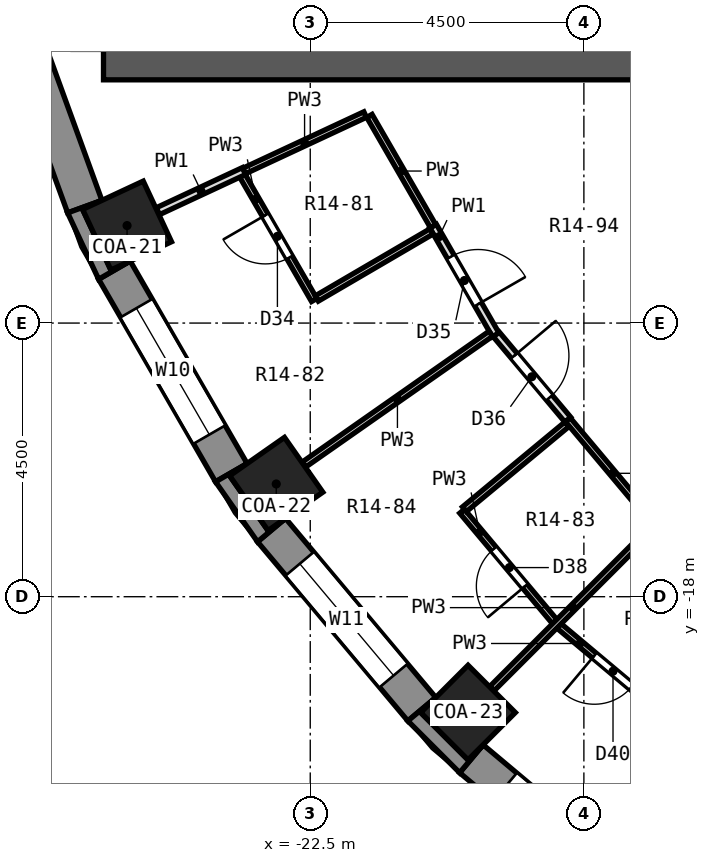
"""IFC4 building model, lengths in metres.
Left out: names, types, materials, properties, quantities, classifications, styles, units other than length and angle.
Written with IfcOpenShell. Run it as: python <this file> out.ifc"""

import sys

from ifc_helpers import new_model, si_unit, direction, frame, frame_2d, origin, origin_2d, place, context, subcontext, project, spatial, polyline, rectangle, outline, extrude, element, fill, save


model = new_model("IFC4")
c1 = context("Model", 3, precision=1e-05, world=origin(), true_north=direction((0.0, 1.0)))
c2 = subcontext(c1, "Body", "Model", "MODEL_VIEW")
j1 = project(units=[si_unit("LENGTHUNIT", "METRE"), si_unit("PLANEANGLEUNIT", "RADIAN")], contexts=[c1])
p1 = place(None, origin())
s1 = spatial("IfcSite", under=j1, at=p1, CompositionType="ELEMENT")
p2 = place(p1, origin())
s2 = spatial("IfcBuilding", under=s1, at=p2, CompositionType="ELEMENT")
p3 = place(p2, frame((0.0, 0.0, 75.8)))
s3 = spatial("IfcBuildingStorey", under=s2, at=p3, CompositionType="ELEMENT", Elevation=75.8)
for number, where, z_axis, x_axis in (
    (1, (-25.512, -11.897, 0.0), (0.0, 0.0, 1.0), (-0.906, -0.423, 0.0)),
    (2, (-23.059, -16.146, 0.0), (0.0, 0.0, 1.0), (-0.819, -0.574, 0.0)),
    (3, (-19.905, -19.905, 0.0), (0.0, 0.0, 1.0), (-0.707, -0.707, 0.0)),
):
    element("IfcColumn", number, at=place(p3, frame(where, z_axis=z_axis, x_axis=x_axis)), inside=s3, PredefinedType="COLUMN", context=c2, shape_type="SweptSolid", body=[
        extrude(rectangle(XDim=1.1, YDim=1.1, at=origin_2d()), origin(), (0.0, 0.0, 1.0), 3.3),
    ])
p4 = place(p3, frame((-13.5, -9.0, 0.0), z_axis=(0.0, 0.0, 1.0), x_axis=(-1.0, 0.0, 0.0)))
e4 = element("IfcWall", 4, at=p4, inside=s3, PredefinedType="SHEAR", context=c2, shape_type="SweptSolid", body=[
    extrude(rectangle(XDim=12.4, YDim=1.0, at=frame_2d((6.2, 0.0))), origin(), (0.0, 0.0, 1.0), 3.3),
])
p5 = place(p3, frame((-27.523, -7.971, 0.0), z_axis=(0.0, 0.0, 1.0), x_axis=(0.342028474173, -0.939689588564, 0.0)))
e5 = element("IfcWall", 5, at=p5, inside=s3, PredefinedType="SOLIDWALL", context=c2, shape_type="SweptSolid", body=[
    extrude(rectangle(XDim=3.846, YDim=0.6, at=frame_2d((1.923, 0.0))), origin(), (0.0, 0.0, 1.0), 2.75),
])
p6 = place(p3, frame((-25.721, -12.63, 0.0), z_axis=(0.0, 0.0, 1.0), x_axis=(0.499989888488, -0.86603124159, 0.0)))
e6 = element("IfcWall", 6, at=p6, inside=s3, PredefinedType="SOLIDWALL", context=c2, shape_type="SweptSolid", body=[
    extrude(rectangle(XDim=3.846, YDim=0.6, at=frame_2d((1.923, 0.0))), origin(), (0.0, 0.0, 1.0), 2.75),
])
p7 = place(p6, frame((0.723, 0.0, 0.9)))
e7 = element("IfcOpeningElement", 7, at=p7, cuts=e6, PredefinedType="OPENING", context=c2, shape_type="SweptSolid", body=[
    extrude(rectangle(XDim=2.4, YDim=1.8, at=frame_2d((1.2, 0.9))), frame((0.0, 0.312, 0.0), z_axis=(0.0, -1.0, 0.0), x_axis=(1.0, 0.0, 0.0)), (0.0, 0.0, 1.0), 0.624),
])
p8 = place(p3, frame((-23.137, -16.904, 0.0), z_axis=(0.0, 0.0, 1.0), x_axis=(0.642809392687, -0.766026164483, 0.0)))
e8 = element("IfcWall", 8, at=p8, inside=s3, PredefinedType="SOLIDWALL", context=c2, shape_type="SweptSolid", body=[
    extrude(rectangle(XDim=3.846, YDim=0.6, at=frame_2d((1.923, 0.0))), origin(), (0.0, 0.0, 1.0), 2.75),
])
p9 = place(p8, frame((0.723, 0.0, 0.9)))
e9 = element("IfcOpeningElement", 9, at=p9, cuts=e8, PredefinedType="OPENING", context=c2, shape_type="SweptSolid", body=[
    extrude(rectangle(XDim=2.4, YDim=1.8, at=frame_2d((1.2, 0.9))), frame((0.0, 0.312, 0.0), z_axis=(0.0, -1.0, 0.0), x_axis=(1.0, 0.0, 0.0)), (0.0, 0.0, 1.0), 0.624),
])
p10 = place(p3, frame((-19.85, -20.665, 0.0), z_axis=(0.0, 0.0, 1.0), x_axis=(0.766026164483, -0.642809392687, 0.0)))
e10 = element("IfcWall", 10, at=p10, inside=s3, PredefinedType="SOLIDWALL", context=c2, shape_type="SweptSolid", body=[
    extrude(rectangle(XDim=3.846, YDim=0.6, at=frame_2d((1.923, 0.0))), origin(), (0.0, 0.0, 1.0), 2.75),
])
p11 = place(p10, frame((0.723, 0.0, 0.9)))
e11 = element("IfcOpeningElement", 11, at=p11, cuts=e10, PredefinedType="OPENING", context=c2, shape_type="SweptSolid", body=[
    extrude(rectangle(XDim=2.4, YDim=1.8, at=frame_2d((1.2, 0.9))), frame((0.0, 0.312, 0.0), z_axis=(0.0, -1.0, 0.0), x_axis=(1.0, 0.0, 0.0)), (0.0, 0.0, 1.0), 0.624),
])
p12 = place(p3, origin())
e12 = element("IfcWall", 12, at=p12, inside=s3, PredefinedType="SOLIDWALL", context=c2, shape_type="SweptSolid", body=[
    extrude(outline(polyline([(-25.981, -12.78), (-25.461, -12.479), (-25.779, -12.628), (-26.243, -11.631), (-25.926, -11.483), (-26.49, -11.688), (-25.981, -12.78)])), origin(), (0.0, 0.0, 1.0), 2.75),
])
p13 = place(p3, origin())
e13 = element("IfcWall", 13, at=p13, inside=s3, PredefinedType="SOLIDWALL", context=c2, shape_type="SweptSolid", body=[
    extrude(outline(polyline([(-24.058, -16.11), (-23.367, -17.097), (-22.907, -16.711), (-23.194, -16.912), (-23.825, -16.011), (-23.538, -15.81), (-24.058, -16.11)])), origin(), (0.0, 0.0, 1.0), 2.75),
])
p14 = place(p3, origin())
e14 = element("IfcWall", 14, at=p14, inside=s3, PredefinedType="SOLIDWALL", context=c2, shape_type="SweptSolid", body=[
    extrude(outline(polyline([(-20.043, -20.895), (-19.657, -20.435), (-19.905, -20.683), (-20.683, -19.905), (-20.435, -19.657), (-20.895, -20.043), (-20.043, -20.895)])), origin(), (0.0, 0.0, 1.0), 2.75),
])
p15 = place(p3, frame((-20.48, -11.906, 0.0), z_axis=(0.0, 0.0, 1.0), x_axis=(0.499101616471, -0.866543464828, 0.0)))
e15 = element("IfcWall", 15, at=p15, inside=s3, PredefinedType="PARTITIONING", context=c2, shape_type="SweptSolid", body=[
    extrude(rectangle(XDim=2.066, YDim=0.125, at=frame_2d((1.033, 0.0))), origin(), (0.0, 0.0, 1.0), 2.75),
])
p16 = place(p15, frame((0.582, 0.0, 0.0)))
e16 = element("IfcOpeningElement", 16, at=p16, cuts=e15, PredefinedType="OPENING", context=c2, shape_type="SweptSolid", body=[
    extrude(rectangle(XDim=0.9, YDim=2.1, at=frame_2d((0.45, 1.05))), frame((0.0, 0.074, 0.0), z_axis=(0.0, -1.0, 0.0), x_axis=(1.0, 0.0, 0.0)), (0.0, 0.0, 1.0), 0.149),
])
p17 = place(p3, frame((-23.619, -11.071, 0.0), z_axis=(0.0, 0.0, 1.0), x_axis=(0.500121220083, -0.865955406025, 0.0)))
e17 = element("IfcWall", 17, at=p17, inside=s3, PredefinedType="PARTITIONING", context=c2, shape_type="SweptSolid", body=[
    extrude(rectangle(XDim=2.367, YDim=0.1, at=frame_2d((1.184, 0.0))), origin(), (0.0, 0.0, 1.0), 2.75),
])
p18 = place(p17, frame((0.757, 0.0, 0.0)))
e18 = element("IfcOpeningElement", 18, at=p18, cuts=e17, PredefinedType="OPENING", context=c2, shape_type="SweptSolid", body=[
    extrude(rectangle(XDim=0.8, YDim=2.1, at=frame_2d((0.4, 1.05))), frame((0.0, 0.062, 0.0), z_axis=(0.0, -1.0, 0.0), x_axis=(1.0, 0.0, 0.0)), (0.0, 0.0, 1.0), 0.124),
])
p19 = place(p3, frame((-21.527, -10.093, 0.0), z_axis=(0.0, 0.0, 1.0), x_axis=(0.500153222552, -0.865936922628, 0.0)))
e19 = element("IfcWall", 19, at=p19, inside=s3, PredefinedType="PARTITIONING", context=c2, shape_type="SweptSolid", body=[
    extrude(rectangle(XDim=2.093, YDim=0.1, at=frame_2d((1.046, 0.0))), origin(), (0.0, 0.0, 1.0), 2.75),
])
p20 = place(p3, frame((-20.003, -16.594, 0.0), z_axis=(0.0, 0.0, 1.0), x_axis=(0.642582995886, -0.766216087927, 0.0)))
e20 = element("IfcWall", 20, at=p20, inside=s3, PredefinedType="PARTITIONING", context=c2, shape_type="SweptSolid", body=[
    extrude(rectangle(XDim=2.37, YDim=0.1, at=frame_2d((1.185, 0.0))), origin(), (0.0, 0.0, 1.0), 2.75),
])
p21 = place(p20, frame((0.81, 0.0, 0.0)))
e21 = element("IfcOpeningElement", 21, at=p21, cuts=e20, PredefinedType="OPENING", context=c2, shape_type="SweptSolid", body=[
    extrude(rectangle(XDim=0.8, YDim=2.1, at=frame_2d((0.4, 1.05))), frame((0.0, 0.062, 0.0), z_axis=(0.0, -1.0, 0.0), x_axis=(1.0, 0.0, 0.0)), (0.0, 0.0, 1.0), 0.124),
])
p22 = place(p3, frame((-18.265, -15.088, 0.0), z_axis=(0.0, 0.0, 1.0), x_axis=(0.642971075568, -0.765890459519, 0.0)))
e22 = element("IfcWall", 22, at=p22, inside=s3, PredefinedType="PARTITIONING", context=c2, shape_type="SweptSolid", body=[
    extrude(rectangle(XDim=2.306, YDim=0.1, at=frame_2d((1.153, 0.0))), origin(), (0.0, 0.0, 1.0), 2.75),
])
p23 = place(p3, frame((-19.44, -13.688, 0.0), z_axis=(0.0, 0.0, 1.0), x_axis=(0.642900643574, -0.765949582213, 0.0)))
e23 = element("IfcWall", 23, at=p23, inside=s3, PredefinedType="PARTITIONING", context=c2, shape_type="SweptSolid", body=[
    extrude(rectangle(XDim=1.827, YDim=0.125, at=frame_2d((0.914, 0.0))), origin(), (0.0, 0.0, 1.0), 2.75),
])
p24 = place(p23, frame((0.458, 0.0, 0.0)))
e24 = element("IfcOpeningElement", 24, at=p24, cuts=e23, PredefinedType="OPENING", context=c2, shape_type="SweptSolid", body=[
    extrude(rectangle(XDim=0.9, YDim=2.1, at=frame_2d((0.45, 1.05))), frame((0.0, 0.074, 0.0), z_axis=(0.0, -1.0, 0.0), x_axis=(1.0, 0.0, 0.0)), (0.0, 0.0, 1.0), 0.149),
])
p25 = place(p3, frame((-18.41, -18.48, 0.0), z_axis=(0.0, 0.0, 1.0), x_axis=(0.766216087927, -0.642582995886, 0.0)))
e25 = element("IfcWall", 25, at=p25, inside=s3, PredefinedType="PARTITIONING", context=c2, shape_type="SweptSolid", body=[
    extrude(rectangle(XDim=2.37, YDim=0.1, at=frame_2d((1.185, 0.0))), origin(), (0.0, 0.0, 1.0), 2.75),
])
p26 = place(p25, frame((0.76, 0.0, 0.0)))
e26 = element("IfcOpeningElement", 26, at=p26, cuts=e25, PredefinedType="OPENING", context=c2, shape_type="SweptSolid", body=[
    extrude(rectangle(XDim=0.8, YDim=2.1, at=frame_2d((0.4, 1.05))), frame((0.0, 0.062, 0.0), z_axis=(0.0, -1.0, 0.0), x_axis=(1.0, 0.0, 0.0)), (0.0, 0.0, 1.0), 0.124),
])
p27 = place(p3, frame((-25.005, -11.66, 0.0), z_axis=(0.0, 0.0, 1.0), x_axis=(0.906366605584, 0.422492102034, 0.0)))
e27 = element("IfcWall", 27, at=p27, inside=s3, PredefinedType="PARTITIONING", context=c2, shape_type="SweptSolid", body=[
    extrude(rectangle(XDim=1.563, YDim=0.125, at=frame_2d((0.781, 0.0))), origin(), (0.0, 0.0, 1.0), 2.75),
])
p28 = place(p3, frame((-23.588, -11.0, 0.0), z_axis=(0.0, 0.0, 1.0), x_axis=(0.906316523208, 0.422599526454, 0.0)))
e28 = element("IfcWall", 28, at=p28, inside=s3, PredefinedType="PARTITIONING", context=c2, shape_type="SweptSolid", body=[
    extrude(rectangle(XDim=2.197, YDim=0.1, at=frame_2d((1.099, 0.0))), origin(), (0.0, 0.0, 1.0), 2.75),
])
p29 = place(p3, frame((-22.392, -13.096, 0.0), z_axis=(0.0, 0.0, 1.0), x_axis=(0.863305021383, 0.504682514116, 0.0)))
e29 = element("IfcWall", 29, at=p29, inside=s3, PredefinedType="PARTITIONING", context=c2, shape_type="SweptSolid", body=[
    extrude(rectangle(XDim=2.188, YDim=0.1, at=frame_2d((1.094, 0.0))), origin(), (0.0, 0.0, 1.0), 2.75),
])
p30 = place(p3, frame((-22.601, -15.825, 0.0), z_axis=(0.0, 0.0, 1.0), x_axis=(0.819152325028, 0.573576035414, 0.0)))
e30 = element("IfcWall", 30, at=p30, inside=s3, PredefinedType="PARTITIONING", context=c2, shape_type="SweptSolid", body=[
    extrude(rectangle(XDim=3.747, YDim=0.1, at=frame_2d((1.874, 0.0))), origin(), (0.0, 0.0, 1.0), 2.75),
])
p31 = place(p3, frame((-19.965, -16.562, 0.0), z_axis=(0.0, 0.0, 1.0), x_axis=(0.769792742447, 0.638293924204, 0.0)))
e31 = element("IfcWall", 31, at=p31, inside=s3, PredefinedType="PARTITIONING", context=c2, shape_type="SweptSolid", body=[
    extrude(rectangle(XDim=2.187, YDim=0.1, at=frame_2d((1.094, 0.0))), origin(), (0.0, 0.0, 1.0), 2.75),
])
p32 = place(p3, frame((-19.509, -19.509, 0.0), z_axis=(0.0, 0.0, 1.0), x_axis=(0.707106781187, 0.707106781187, 0.0)))
e32 = element("IfcWall", 32, at=p32, inside=s3, PredefinedType="PARTITIONING", context=c2, shape_type="SweptSolid", body=[
    extrude(rectangle(XDim=3.76, YDim=0.1, at=frame_2d((1.88, 0.0))), origin(), (0.0, 0.0, 1.0), 2.75),
])
p33 = place(p7, origin())
e33 = element("IfcWindow", 33, at=p33, inside=s3, PartitioningType="SINGLE_PANEL", PredefinedType="WINDOW", context=c2, shape_type="SweptSolid", body=[
    extrude(rectangle(XDim=2.4, YDim=1.8, at=frame_2d((1.2, 0.9))), frame((0.0, 0.18, 0.0), z_axis=(0.0, -1.0, 0.0), x_axis=(1.0, 0.0, 0.0)), (0.0, 0.0, 1.0), 0.06),
])
fill(e7, e33)
p34 = place(p9, origin())
e34 = element("IfcWindow", 34, at=p34, inside=s3, PartitioningType="SINGLE_PANEL", PredefinedType="WINDOW", context=c2, shape_type="SweptSolid", body=[
    extrude(rectangle(XDim=2.4, YDim=1.8, at=frame_2d((1.2, 0.9))), frame((0.0, 0.18, 0.0), z_axis=(0.0, -1.0, 0.0), x_axis=(1.0, 0.0, 0.0)), (0.0, 0.0, 1.0), 0.06),
])
fill(e9, e34)
p35 = place(p11, origin())
e35 = element("IfcWindow", 35, at=p35, inside=s3, PartitioningType="SINGLE_PANEL", PredefinedType="WINDOW", context=c2, shape_type="SweptSolid", body=[
    extrude(rectangle(XDim=2.4, YDim=1.8, at=frame_2d((1.2, 0.9))), frame((0.0, 0.18, 0.0), z_axis=(0.0, -1.0, 0.0), x_axis=(1.0, 0.0, 0.0)), (0.0, 0.0, 1.0), 0.06),
])
fill(e11, e35)
p36 = place(p18, frame((0.8, 0.0, 0.0), z_axis=(0.0, 0.0, 1.0), x_axis=(-1.0, 0.0, 0.0)))
e36 = element("IfcDoor", 36, at=p36, inside=s3, OperationType="SINGLE_SWING_RIGHT", PredefinedType="DOOR", context=c2, shape_type="SweptSolid", body=[
    extrude(rectangle(XDim=0.8, YDim=2.1, at=frame_2d((0.4, 1.05))), frame((0.0, 0.025, 0.0), z_axis=(0.0, -1.0, 0.0), x_axis=(1.0, 0.0, 0.0)), (0.0, 0.0, 1.0), 0.05),
])
fill(e18, e36)
p37 = place(p16, origin())
e37 = element("IfcDoor", 37, at=p37, inside=s3, OperationType="SINGLE_SWING_RIGHT", PredefinedType="DOOR", context=c2, shape_type="SweptSolid", body=[
    extrude(rectangle(XDim=0.9, YDim=2.1, at=frame_2d((0.45, 1.05))), frame((0.0, 0.025, 0.0), z_axis=(0.0, -1.0, 0.0), x_axis=(1.0, 0.0, 0.0)), (0.0, 0.0, 1.0), 0.05),
])
fill(e16, e37)
p38 = place(p24, origin())
e38 = element("IfcDoor", 38, at=p38, inside=s3, OperationType="SINGLE_SWING_LEFT", PredefinedType="DOOR", context=c2, shape_type="SweptSolid", body=[
    extrude(rectangle(XDim=0.9, YDim=2.1, at=frame_2d((0.45, 1.05))), frame((0.0, 0.025, 0.0), z_axis=(0.0, -1.0, 0.0), x_axis=(1.0, 0.0, 0.0)), (0.0, 0.0, 1.0), 0.05),
])
fill(e24, e38)
p39 = place(p21, frame((0.8, 0.0, 0.0), z_axis=(0.0, 0.0, 1.0), x_axis=(-1.0, 0.0, 0.0)))
e39 = element("IfcDoor", 39, at=p39, inside=s3, OperationType="SINGLE_SWING_LEFT", PredefinedType="DOOR", context=c2, shape_type="SweptSolid", body=[
    extrude(rectangle(XDim=0.8, YDim=2.1, at=frame_2d((0.4, 1.05))), frame((0.0, 0.025, 0.0), z_axis=(0.0, -1.0, 0.0), x_axis=(1.0, 0.0, 0.0)), (0.0, 0.0, 1.0), 0.05),
])
fill(e21, e39)
p40 = place(p26, frame((0.8, 0.0, 0.0), z_axis=(0.0, 0.0, 1.0), x_axis=(-1.0, 0.0, 0.0)))
e40 = element("IfcDoor", 40, at=p40, inside=s3, OperationType="SINGLE_SWING_RIGHT", PredefinedType="DOOR", context=c2, shape_type="SweptSolid", body=[
    extrude(rectangle(XDim=0.8, YDim=2.1, at=frame_2d((0.4, 1.05))), frame((0.0, 0.025, 0.0), z_axis=(0.0, -1.0, 0.0), x_axis=(1.0, 0.0, 0.0)), (0.0, 0.0, 1.0), 0.05),
])
fill(e26, e40)
save(model, sys.argv[1])
